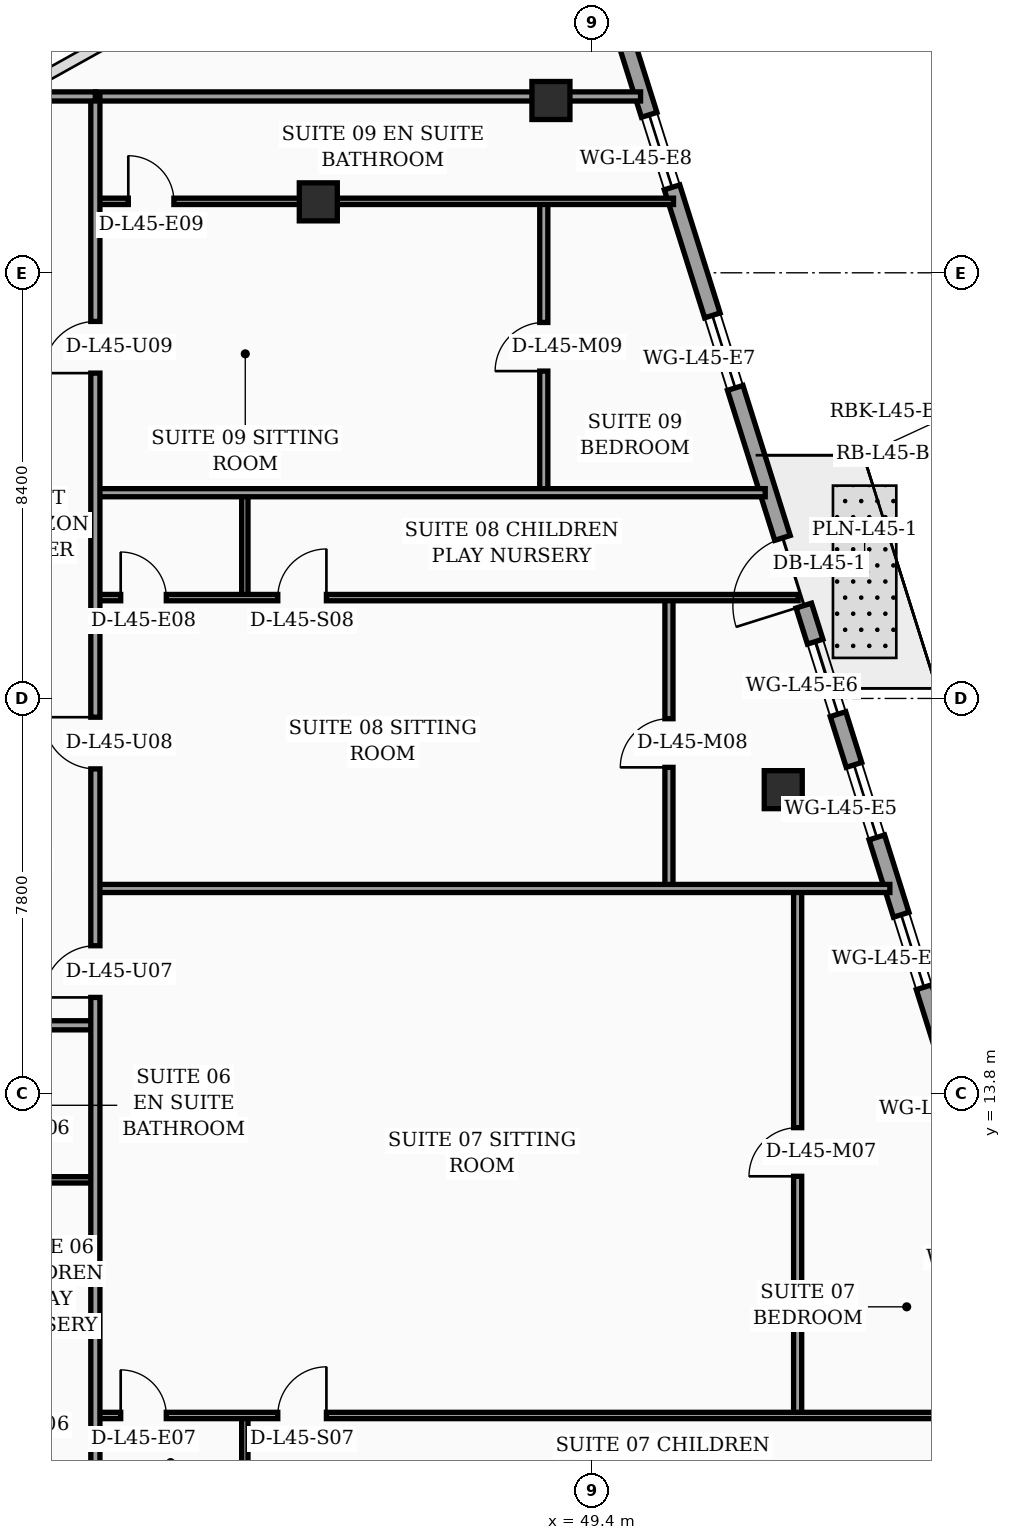
"""IFC4 building model, lengths in metres.
Left out: names, types, materials, properties, quantities, classifications, styles, units other than length and angle.
Written with IfcOpenShell. Run it as: python <this file> out.ifc"""

import sys

from ifc_helpers import new_model, si_unit, direction, frame, frame_2d, origin, origin_2d, place, context, subcontext, project, spatial, rectangle, hollow_rectangle, extrude, element, fill, save


model = new_model("IFC4")
c1 = context("Model", 3, precision=1e-05, world=origin(), true_north=direction((0.0, 1.0)))
c2 = subcontext(c1, "Body", "Model", "MODEL_VIEW")
j1 = project(units=[si_unit("LENGTHUNIT", "METRE"), si_unit("PLANEANGLEUNIT", "RADIAN")], contexts=[c1])
p1 = place(None, origin())
s1 = spatial("IfcSite", under=j1, at=p1, CompositionType="ELEMENT")
p2 = place(p1, origin())
s2 = spatial("IfcBuilding", under=s1, at=p2, CompositionType="ELEMENT")
p3 = place(p2, frame((0.0, 0.0, 182.7)))
s3 = spatial("IfcBuildingStorey", under=s2, at=p3, CompositionType="ELEMENT", Elevation=182.7)
for number, where, z_axis, x_axis in (
    (1, (44.0, 31.4, 0.0), (0.0, 0.0, 1.0), (1.0, 0.0, 0.0)),
    (2, (53.176, 19.8, 0.0), (0.0, 0.0, 1.0), (1.0, 0.0, 0.0)),
    (3, (48.591, 33.4, 0.0), (0.0, 0.0, 1.0), (1.0, 0.0, 0.0)),
):
    element("IfcColumn", number, at=place(p3, frame(where, z_axis=z_axis, x_axis=x_axis)), inside=s3, PredefinedType="COLUMN", context=c2, shape_type="SweptSolid", body=[
        extrude(hollow_rectangle(XDim=0.75, YDim=0.75, WallThickness=0.032, at=origin_2d()), origin(), (0.0, 0.0, 1.0), 3.52),
    ])
p4 = place(p3, frame((59.23, 5.505, 0.0), z_axis=(0.0, 0.0, 1.0), x_axis=(-0.300509063924, 0.953778958931, 0.0)))
e4 = element("IfcWall", 4, at=p4, inside=s3, PredefinedType="SOLIDWALL", context=c2, shape_type="SweptSolid", body=[
    extrude(rectangle(XDim=30.814, YDim=0.32, at=frame_2d((15.407, 0.0))), origin(), (0.0, 0.0, 1.0), 3.52),
])
p5 = place(p4, frame((18.796, 0.0, 0.0)))
e5 = element("IfcOpeningElement", 5, at=p5, cuts=e4, PredefinedType="OPENING", context=c2, shape_type="SweptSolid", body=[
    extrude(rectangle(XDim=1.4, YDim=2.25, at=frame_2d((0.7, 1.125))), frame((0.0, 0.17, 0.0), z_axis=(0.0, -1.0, 0.0), x_axis=(1.0, 0.0, 0.0)), (0.0, 0.0, 1.0), 0.34),
])
p6 = place(p4, frame((2.65, 0.0, 0.75)))
e6 = element("IfcOpeningElement", 6, at=p6, cuts=e4, PredefinedType="OPENING", context=c2, shape_type="SweptSolid", body=[
    extrude(rectangle(XDim=1.5, YDim=1.6, at=frame_2d((0.75, 0.8))), frame((0.0, 0.17, 0.0), z_axis=(0.0, -1.0, 0.0), x_axis=(1.0, 0.0, 0.0)), (0.0, 0.0, 1.0), 0.34),
])
p7 = place(p4, frame((4.7, 0.0, 0.75)))
e7 = element("IfcOpeningElement", 7, at=p7, cuts=e4, PredefinedType="OPENING", context=c2, shape_type="SweptSolid", body=[
    extrude(rectangle(XDim=1.5, YDim=1.6, at=frame_2d((0.75, 0.8))), frame((0.0, 0.17, 0.0), z_axis=(0.0, -1.0, 0.0), x_axis=(1.0, 0.0, 0.0)), (0.0, 0.0, 1.0), 0.34),
])
p8 = place(p4, frame((7.8, 0.0, 0.75)))
e8 = element("IfcOpeningElement", 8, at=p8, cuts=e4, PredefinedType="OPENING", context=c2, shape_type="SweptSolid", body=[
    extrude(rectangle(XDim=1.5, YDim=1.6, at=frame_2d((0.75, 0.8))), frame((0.0, 0.17, 0.0), z_axis=(0.0, -1.0, 0.0), x_axis=(1.0, 0.0, 0.0)), (0.0, 0.0, 1.0), 0.34),
])
p9 = place(p4, frame((10.9, 0.0, 0.75)))
e9 = element("IfcOpeningElement", 9, at=p9, cuts=e4, PredefinedType="OPENING", context=c2, shape_type="SweptSolid", body=[
    extrude(rectangle(XDim=1.5, YDim=1.6, at=frame_2d((0.75, 0.8))), frame((0.0, 0.17, 0.0), z_axis=(0.0, -1.0, 0.0), x_axis=(1.0, 0.0, 0.0)), (0.0, 0.0, 1.0), 0.34),
])
p10 = place(p4, frame((14.0, 0.0, 0.75)))
e10 = element("IfcOpeningElement", 10, at=p10, cuts=e4, PredefinedType="OPENING", context=c2, shape_type="SweptSolid", body=[
    extrude(rectangle(XDim=1.5, YDim=1.6, at=frame_2d((0.75, 0.8))), frame((0.0, 0.17, 0.0), z_axis=(0.0, -1.0, 0.0), x_axis=(1.0, 0.0, 0.0)), (0.0, 0.0, 1.0), 0.34),
])
p11 = place(p4, frame((16.55, 0.0, 0.75)))
e11 = element("IfcOpeningElement", 11, at=p11, cuts=e4, PredefinedType="OPENING", context=c2, shape_type="SweptSolid", body=[
    extrude(rectangle(XDim=1.5, YDim=1.6, at=frame_2d((0.75, 0.8))), frame((0.0, 0.17, 0.0), z_axis=(0.0, -1.0, 0.0), x_axis=(1.0, 0.0, 0.0)), (0.0, 0.0, 1.0), 0.34),
])
p12 = place(p4, frame((23.3, 0.0, 0.75)))
e12 = element("IfcOpeningElement", 12, at=p12, cuts=e4, PredefinedType="OPENING", context=c2, shape_type="SweptSolid", body=[
    extrude(rectangle(XDim=1.5, YDim=1.6, at=frame_2d((0.75, 0.8))), frame((0.0, 0.17, 0.0), z_axis=(0.0, -1.0, 0.0), x_axis=(1.0, 0.0, 0.0)), (0.0, 0.0, 1.0), 0.34),
])
p13 = place(p4, frame((27.45, 0.0, 0.75)))
e13 = element("IfcOpeningElement", 13, at=p13, cuts=e4, PredefinedType="OPENING", context=c2, shape_type="SweptSolid", body=[
    extrude(rectangle(XDim=1.5, YDim=1.6, at=frame_2d((0.75, 0.8))), frame((0.0, 0.17, 0.0), z_axis=(0.0, -1.0, 0.0), x_axis=(1.0, 0.0, 0.0)), (0.0, 0.0, 1.0), 0.34),
])
p14 = place(p3, frame((37.6, 12.1, 0.0), z_axis=(0.0, 0.0, 1.0), x_axis=(1.0, 0.0, 0.0)))
e14 = element("IfcWall", 14, at=p14, inside=s3, PredefinedType="PARTITIONING", context=c2, shape_type="SweptSolid", body=[
    extrude(rectangle(XDim=2.0, YDim=0.125, at=frame_2d((1.0, 0.0))), origin(), (0.0, 0.0, 1.0), 3.52),
])
p15 = place(p3, frame((32.4, 15.15, 0.0), z_axis=(0.0, 0.0, 1.0), x_axis=(1.0, 0.0, 0.0)))
e15 = element("IfcWall", 15, at=p15, inside=s3, PredefinedType="PARTITIONING", context=c2, shape_type="SweptSolid", body=[
    extrude(rectangle(XDim=7.2, YDim=0.18, at=frame_2d((3.6, 0.0))), origin(), (0.0, 0.0, 1.0), 2.92),
])
p16 = place(p15, frame((2.19, 0.0, 0.0)))
e16 = element("IfcOpeningElement", 16, at=p16, cuts=e15, PredefinedType="OPENING", context=c2, shape_type="SweptSolid", body=[
    extrude(rectangle(XDim=1.02, YDim=2.2, at=frame_2d((0.51, 1.1))), frame((0.0, 0.1, 0.0), z_axis=(0.0, -1.0, 0.0), x_axis=(1.0, 0.0, 0.0)), (0.0, 0.0, 1.0), 0.2),
])
p17 = place(p3, frame((42.55, 5.66, 0.0), z_axis=(0.0, 0.0, 1.0), x_axis=(0.0, 1.0, 0.0)))
e17 = element("IfcWall", 17, at=p17, inside=s3, PredefinedType="PARTITIONING", context=c2, shape_type="SweptSolid", body=[
    extrude(rectangle(XDim=1.79, YDim=0.125, at=frame_2d((0.895, 0.0))), origin(), (0.0, 0.0, 1.0), 3.52),
])
p18 = place(p3, frame((53.46, 7.45, 0.0), z_axis=(0.0, 0.0, 1.0), x_axis=(0.0, 1.0, 0.0)))
e18 = element("IfcWall", 18, at=p18, inside=s3, PredefinedType="PARTITIONING", context=c2, shape_type="SweptSolid", body=[
    extrude(rectangle(XDim=10.4, YDim=0.16, at=frame_2d((5.2, 0.0))), origin(), (0.0, 0.0, 1.0), 3.02),
])
p19 = place(p18, frame((4.72, 0.0, 0.0)))
e19 = element("IfcOpeningElement", 19, at=p19, cuts=e18, PredefinedType="OPENING", context=c2, shape_type="SweptSolid", body=[
    extrude(rectangle(XDim=0.96, YDim=2.2, at=frame_2d((0.48, 1.1))), frame((0.0, 0.09, 0.0), z_axis=(0.0, -1.0, 0.0), x_axis=(1.0, 0.0, 0.0)), (0.0, 0.0, 1.0), 0.18),
])
p20 = place(p3, frame((39.6, 7.45, 0.0), z_axis=(0.0, 0.0, 1.0), x_axis=(1.0, 0.0, 0.0)))
e20 = element("IfcWall", 20, at=p20, inside=s3, PredefinedType="PARTITIONING", context=c2, shape_type="SweptSolid", body=[
    extrude(rectangle(XDim=18.96, YDim=0.125, at=frame_2d((9.48, 0.0))), origin(), (0.0, 0.0, 1.0), 2.92),
])
p21 = place(p20, frame((0.5, 0.0, 0.0)))
e21 = element("IfcOpeningElement", 21, at=p21, cuts=e20, PredefinedType="OPENING", context=c2, shape_type="SweptSolid", body=[
    extrude(rectangle(XDim=0.9, YDim=2.15, at=frame_2d((0.45, 1.075))), frame((0.0, 0.073, 0.0), z_axis=(0.0, -1.0, 0.0), x_axis=(1.0, 0.0, 0.0)), (0.0, 0.0, 1.0), 0.145),
])
p22 = place(p20, frame((3.6, 0.0, 0.0)))
e22 = element("IfcOpeningElement", 22, at=p22, cuts=e20, PredefinedType="OPENING", context=c2, shape_type="SweptSolid", body=[
    extrude(rectangle(XDim=0.96, YDim=2.2, at=frame_2d((0.48, 1.1))), frame((0.0, 0.073, 0.0), z_axis=(0.0, -1.0, 0.0), x_axis=(1.0, 0.0, 0.0)), (0.0, 0.0, 1.0), 0.145),
])
p23 = place(p3, frame((42.55, 23.59, 0.0), z_axis=(0.0, 0.0, 1.0), x_axis=(0.0, 1.0, 0.0)))
e23 = element("IfcWall", 23, at=p23, inside=s3, PredefinedType="PARTITIONING", context=c2, shape_type="SweptSolid", body=[
    extrude(rectangle(XDim=2.07, YDim=0.125, at=frame_2d((1.035, 0.0))), origin(), (0.0, 0.0, 1.0), 3.17),
])
p24 = place(p3, frame((50.92, 17.85, 0.0), z_axis=(0.0, 0.0, 1.0), x_axis=(0.0, 1.0, 0.0)))
e24 = element("IfcWall", 24, at=p24, inside=s3, PredefinedType="PARTITIONING", context=c2, shape_type="SweptSolid", body=[
    extrude(rectangle(XDim=5.74, YDim=0.16, at=frame_2d((2.87, 0.0))), origin(), (0.0, 0.0, 1.0), 2.92),
])
p25 = place(p24, frame((2.39, 0.0, 0.0)))
e25 = element("IfcOpeningElement", 25, at=p25, cuts=e24, PredefinedType="OPENING", context=c2, shape_type="SweptSolid", body=[
    extrude(rectangle(XDim=0.96, YDim=2.2, at=frame_2d((0.48, 1.1))), frame((0.0, 0.09, 0.0), z_axis=(0.0, -1.0, 0.0), x_axis=(1.0, 0.0, 0.0)), (0.0, 0.0, 1.0), 0.18),
])
p26 = place(p3, frame((39.6, 23.59, 0.0), z_axis=(0.0, 0.0, 1.0), x_axis=(1.0, 0.0, 0.0)))
e26 = element("IfcWall", 26, at=p26, inside=s3, PredefinedType="PARTITIONING", context=c2, shape_type="SweptSolid", body=[
    extrude(rectangle(XDim=13.87, YDim=0.125, at=frame_2d((6.935, 0.0))), origin(), (0.0, 0.0, 1.0), 2.92),
])
p27 = place(p26, frame((0.5, 0.0, 0.0)))
e27 = element("IfcOpeningElement", 27, at=p27, cuts=e26, PredefinedType="OPENING", context=c2, shape_type="SweptSolid", body=[
    extrude(rectangle(XDim=0.9, YDim=2.15, at=frame_2d((0.45, 1.075))), frame((0.0, 0.073, 0.0), z_axis=(0.0, -1.0, 0.0), x_axis=(1.0, 0.0, 0.0)), (0.0, 0.0, 1.0), 0.145),
])
p28 = place(p26, frame((3.6, 0.0, 0.0)))
e28 = element("IfcOpeningElement", 28, at=p28, cuts=e26, PredefinedType="OPENING", context=c2, shape_type="SweptSolid", body=[
    extrude(rectangle(XDim=0.96, YDim=2.2, at=frame_2d((0.48, 1.1))), frame((0.0, 0.073, 0.0), z_axis=(0.0, -1.0, 0.0), x_axis=(1.0, 0.0, 0.0)), (0.0, 0.0, 1.0), 0.145),
])
p29 = place(p3, frame((48.45, 25.66, 0.0), z_axis=(0.0, 0.0, 1.0), x_axis=(0.0, 1.0, 0.0)))
e29 = element("IfcWall", 29, at=p29, inside=s3, PredefinedType="PARTITIONING", context=c2, shape_type="SweptSolid", body=[
    extrude(rectangle(XDim=5.75, YDim=0.16, at=frame_2d((2.875, 0.0))), origin(), (0.0, 0.0, 1.0), 3.52),
])
p30 = place(p29, frame((2.4, 0.0, 0.0)))
e30 = element("IfcOpeningElement", 30, at=p30, cuts=e29, PredefinedType="OPENING", context=c2, shape_type="SweptSolid", body=[
    extrude(rectangle(XDim=0.96, YDim=2.2, at=frame_2d((0.48, 1.1))), frame((0.0, 0.09, 0.0), z_axis=(0.0, -1.0, 0.0), x_axis=(1.0, 0.0, 0.0)), (0.0, 0.0, 1.0), 0.18),
])
p31 = place(p3, frame((39.6, 31.41, 0.0), z_axis=(0.0, 0.0, 1.0), x_axis=(1.0, 0.0, 0.0)))
e31 = element("IfcWall", 31, at=p31, inside=s3, PredefinedType="PARTITIONING", context=c2, shape_type="SweptSolid", body=[
    extrude(rectangle(XDim=11.41, YDim=0.125, at=frame_2d((5.705, 0.0))), origin(), (0.0, 0.0, 1.0), 2.92),
])
p32 = place(p31, frame((0.65, 0.0, 0.0)))
e32 = element("IfcOpeningElement", 32, at=p32, cuts=e31, PredefinedType="OPENING", context=c2, shape_type="SweptSolid", body=[
    extrude(rectangle(XDim=0.9, YDim=2.15, at=frame_2d((0.45, 1.075))), frame((0.0, 0.073, 0.0), z_axis=(0.0, -1.0, 0.0), x_axis=(1.0, 0.0, 0.0)), (0.0, 0.0, 1.0), 0.145),
])
p33 = place(p3, frame((39.6, 25.66, 0.0), z_axis=(0.0, 0.0, 1.0), x_axis=(1.0, 0.0, 0.0)))
e33 = element("IfcWall", 33, at=p33, inside=s3, PredefinedType="PARTITIONING", context=c2, shape_type="SweptSolid", body=[
    extrude(rectangle(XDim=13.22, YDim=0.16, at=frame_2d((6.61, 0.0))), origin(), (0.0, 0.0, 1.0), 2.92),
])
p34 = place(p3, frame((39.6, 17.85, 0.0), z_axis=(0.0, 0.0, 1.0), x_axis=(1.0, 0.0, 0.0)))
e34 = element("IfcWall", 34, at=p34, inside=s3, PredefinedType="PARTITIONING", context=c2, shape_type="SweptSolid", body=[
    extrude(rectangle(XDim=15.68, YDim=0.16, at=frame_2d((7.84, 0.0))), origin(), (0.0, 0.0, 1.0), 2.92),
])
p35 = place(p3, frame((39.6, 33.48, 0.0), z_axis=(0.0, 0.0, 1.0), x_axis=(1.0, 0.0, 0.0)))
e35 = element("IfcWall", 35, at=p35, inside=s3, PredefinedType="PARTITIONING", context=c2, shape_type="SweptSolid", body=[
    extrude(rectangle(XDim=10.76, YDim=0.18, at=frame_2d((5.38, 0.0))), origin(), (0.0, 0.0, 1.0), 2.92),
])
p36 = place(p3, frame((39.6, 2.44, 0.0), z_axis=(0.0, 0.0, 1.0), x_axis=(0.0, 1.0, 0.0)))
e36 = element("IfcWall", 36, at=p36, inside=s3, PredefinedType="PARTITIONING", context=c2, shape_type="SweptSolid", body=[
    extrude(rectangle(XDim=31.04, YDim=0.18, at=frame_2d((15.52, 0.0))), origin(), (0.0, 0.0, 1.0), 2.92),
])
p37 = place(p36, frame((13.26, 0.0, 0.0)))
e37 = element("IfcOpeningElement", 37, at=p37, cuts=e36, PredefinedType="OPENING", context=c2, shape_type="SweptSolid", body=[
    extrude(rectangle(XDim=1.02, YDim=2.2, at=frame_2d((0.51, 1.1))), frame((0.0, 0.1, 0.0), z_axis=(0.0, -1.0, 0.0), x_axis=(1.0, 0.0, 0.0)), (0.0, 0.0, 1.0), 0.2),
])
p38 = place(p36, frame((17.77, 0.0, 0.0)))
e38 = element("IfcOpeningElement", 38, at=p38, cuts=e36, PredefinedType="OPENING", context=c2, shape_type="SweptSolid", body=[
    extrude(rectangle(XDim=1.02, YDim=2.2, at=frame_2d((0.51, 1.1))), frame((0.0, 0.1, 0.0), z_axis=(0.0, -1.0, 0.0), x_axis=(1.0, 0.0, 0.0)), (0.0, 0.0, 1.0), 0.2),
])
p39 = place(p36, frame((25.58, 0.0, 0.0)))
e39 = element("IfcOpeningElement", 39, at=p39, cuts=e36, PredefinedType="OPENING", context=c2, shape_type="SweptSolid", body=[
    extrude(rectangle(XDim=1.02, YDim=2.2, at=frame_2d((0.51, 1.1))), frame((0.0, 0.1, 0.0), z_axis=(0.0, -1.0, 0.0), x_axis=(1.0, 0.0, 0.0)), (0.0, 0.0, 1.0), 0.2),
])
p40 = place(p3, frame((37.25, 33.48, 0.0), z_axis=(0.0, 0.0, 1.0), x_axis=(1.0, 0.0, 0.0)))
e40 = element("IfcWall", 40, at=p40, inside=s3, PredefinedType="PARTITIONING", context=c2, shape_type="SweptSolid", body=[
    extrude(rectangle(XDim=2.35, YDim=0.18, at=frame_2d((1.175, 0.0))), origin(), (0.0, 0.0, 1.0), 3.52),
])
p41 = place(p5, origin())
e41 = element("IfcDoor", 41, at=p41, inside=s3, OperationType="SINGLE_SWING_LEFT", PredefinedType="DOOR", context=c2, shape_type="SweptSolid", body=[
    extrude(rectangle(XDim=1.4, YDim=2.25, at=frame_2d((0.7, 1.125))), frame((0.0, 0.025, 0.0), z_axis=(0.0, -1.0, 0.0), x_axis=(1.0, 0.0, 0.0)), (0.0, 0.0, 1.0), 0.05),
])
fill(e5, e41)
p42 = place(p9, origin())
e42 = element("IfcWindow", 42, at=p42, inside=s3, PartitioningType="SINGLE_PANEL", PredefinedType="WINDOW", context=c2, shape_type="SweptSolid", body=[
    extrude(rectangle(XDim=1.5, YDim=1.6, at=frame_2d((0.75, 0.8))), frame((0.0, 0.03, 0.0), z_axis=(0.0, -1.0, 0.0), x_axis=(1.0, 0.0, 0.0)), (0.0, 0.0, 1.0), 0.06),
])
fill(e9, e42)
p43 = place(p10, origin())
e43 = element("IfcWindow", 43, at=p43, inside=s3, PartitioningType="SINGLE_PANEL", PredefinedType="WINDOW", context=c2, shape_type="SweptSolid", body=[
    extrude(rectangle(XDim=1.5, YDim=1.6, at=frame_2d((0.75, 0.8))), frame((0.0, 0.03, 0.0), z_axis=(0.0, -1.0, 0.0), x_axis=(1.0, 0.0, 0.0)), (0.0, 0.0, 1.0), 0.06),
])
fill(e10, e43)
p44 = place(p11, origin())
e44 = element("IfcWindow", 44, at=p44, inside=s3, PartitioningType="SINGLE_PANEL", PredefinedType="WINDOW", context=c2, shape_type="SweptSolid", body=[
    extrude(rectangle(XDim=1.5, YDim=1.6, at=frame_2d((0.75, 0.8))), frame((0.0, 0.03, 0.0), z_axis=(0.0, -1.0, 0.0), x_axis=(1.0, 0.0, 0.0)), (0.0, 0.0, 1.0), 0.06),
])
fill(e11, e44)
p45 = place(p12, origin())
e45 = element("IfcWindow", 45, at=p45, inside=s3, PartitioningType="SINGLE_PANEL", PredefinedType="WINDOW", context=c2, shape_type="SweptSolid", body=[
    extrude(rectangle(XDim=1.5, YDim=1.6, at=frame_2d((0.75, 0.8))), frame((0.0, 0.03, 0.0), z_axis=(0.0, -1.0, 0.0), x_axis=(1.0, 0.0, 0.0)), (0.0, 0.0, 1.0), 0.06),
])
fill(e12, e45)
p46 = place(p13, origin())
e46 = element("IfcWindow", 46, at=p46, inside=s3, PartitioningType="SINGLE_PANEL", PredefinedType="WINDOW", context=c2, shape_type="SweptSolid", body=[
    extrude(rectangle(XDim=1.5, YDim=1.6, at=frame_2d((0.75, 0.8))), frame((0.0, 0.03, 0.0), z_axis=(0.0, -1.0, 0.0), x_axis=(1.0, 0.0, 0.0)), (0.0, 0.0, 1.0), 0.06),
])
fill(e13, e46)
p47 = place(p19, origin())
e47 = element("IfcDoor", 47, at=p47, inside=s3, OperationType="SINGLE_SWING_LEFT", PredefinedType="DOOR", context=c2, shape_type="SweptSolid", body=[
    extrude(rectangle(XDim=0.96, YDim=2.2, at=frame_2d((0.48, 1.1))), frame((0.0, 0.025, 0.0), z_axis=(0.0, -1.0, 0.0), x_axis=(1.0, 0.0, 0.0)), (0.0, 0.0, 1.0), 0.05),
])
fill(e19, e47)
p48 = place(p21, origin())
e48 = element("IfcDoor", 48, at=p48, inside=s3, OperationType="SINGLE_SWING_LEFT", PredefinedType="DOOR", context=c2, shape_type="SweptSolid", body=[
    extrude(rectangle(XDim=0.9, YDim=2.15, at=frame_2d((0.45, 1.075))), frame((0.0, 0.025, 0.0), z_axis=(0.0, -1.0, 0.0), x_axis=(1.0, 0.0, 0.0)), (0.0, 0.0, 1.0), 0.05),
])
fill(e21, e48)
p49 = place(p22, origin())
e49 = element("IfcDoor", 49, at=p49, inside=s3, OperationType="SINGLE_SWING_RIGHT", PredefinedType="DOOR", context=c2, shape_type="SweptSolid", body=[
    extrude(rectangle(XDim=0.96, YDim=2.2, at=frame_2d((0.48, 1.1))), frame((0.0, 0.025, 0.0), z_axis=(0.0, -1.0, 0.0), x_axis=(1.0, 0.0, 0.0)), (0.0, 0.0, 1.0), 0.05),
])
fill(e22, e49)
p50 = place(p25, origin())
e50 = element("IfcDoor", 50, at=p50, inside=s3, OperationType="SINGLE_SWING_LEFT", PredefinedType="DOOR", context=c2, shape_type="SweptSolid", body=[
    extrude(rectangle(XDim=0.96, YDim=2.2, at=frame_2d((0.48, 1.1))), frame((0.0, 0.025, 0.0), z_axis=(0.0, -1.0, 0.0), x_axis=(1.0, 0.0, 0.0)), (0.0, 0.0, 1.0), 0.05),
])
fill(e25, e50)
p51 = place(p27, origin())
e51 = element("IfcDoor", 51, at=p51, inside=s3, OperationType="SINGLE_SWING_LEFT", PredefinedType="DOOR", context=c2, shape_type="SweptSolid", body=[
    extrude(rectangle(XDim=0.9, YDim=2.15, at=frame_2d((0.45, 1.075))), frame((0.0, 0.025, 0.0), z_axis=(0.0, -1.0, 0.0), x_axis=(1.0, 0.0, 0.0)), (0.0, 0.0, 1.0), 0.05),
])
fill(e27, e51)
p52 = place(p28, origin())
e52 = element("IfcDoor", 52, at=p52, inside=s3, OperationType="SINGLE_SWING_RIGHT", PredefinedType="DOOR", context=c2, shape_type="SweptSolid", body=[
    extrude(rectangle(XDim=0.96, YDim=2.2, at=frame_2d((0.48, 1.1))), frame((0.0, 0.025, 0.0), z_axis=(0.0, -1.0, 0.0), x_axis=(1.0, 0.0, 0.0)), (0.0, 0.0, 1.0), 0.05),
])
fill(e28, e52)
p53 = place(p30, origin())
e53 = element("IfcDoor", 53, at=p53, inside=s3, OperationType="SINGLE_SWING_LEFT", PredefinedType="DOOR", context=c2, shape_type="SweptSolid", body=[
    extrude(rectangle(XDim=0.96, YDim=2.2, at=frame_2d((0.48, 1.1))), frame((0.0, 0.025, 0.0), z_axis=(0.0, -1.0, 0.0), x_axis=(1.0, 0.0, 0.0)), (0.0, 0.0, 1.0), 0.05),
])
fill(e30, e53)
p54 = place(p32, origin())
e54 = element("IfcDoor", 54, at=p54, inside=s3, OperationType="SINGLE_SWING_LEFT", PredefinedType="DOOR", context=c2, shape_type="SweptSolid", body=[
    extrude(rectangle(XDim=0.9, YDim=2.15, at=frame_2d((0.45, 1.075))), frame((0.0, 0.025, 0.0), z_axis=(0.0, -1.0, 0.0), x_axis=(1.0, 0.0, 0.0)), (0.0, 0.0, 1.0), 0.05),
])
fill(e32, e54)
p55 = place(p37, origin())
e55 = element("IfcDoor", 55, at=p55, inside=s3, OperationType="SINGLE_SWING_LEFT", PredefinedType="DOOR", context=c2, shape_type="SweptSolid", body=[
    extrude(rectangle(XDim=1.02, YDim=2.2, at=frame_2d((0.51, 1.1))), frame((0.0, 0.025, 0.0), z_axis=(0.0, -1.0, 0.0), x_axis=(1.0, 0.0, 0.0)), (0.0, 0.0, 1.0), 0.05),
])
fill(e37, e55)
p56 = place(p38, origin())
e56 = element("IfcDoor", 56, at=p56, inside=s3, OperationType="SINGLE_SWING_RIGHT", PredefinedType="DOOR", context=c2, shape_type="SweptSolid", body=[
    extrude(rectangle(XDim=1.02, YDim=2.2, at=frame_2d((0.51, 1.1))), frame((0.0, 0.025, 0.0), z_axis=(0.0, -1.0, 0.0), x_axis=(1.0, 0.0, 0.0)), (0.0, 0.0, 1.0), 0.05),
])
fill(e38, e56)
p57 = place(p39, origin())
e57 = element("IfcDoor", 57, at=p57, inside=s3, OperationType="SINGLE_SWING_LEFT", PredefinedType="DOOR", context=c2, shape_type="SweptSolid", body=[
    extrude(rectangle(XDim=1.02, YDim=2.2, at=frame_2d((0.51, 1.1))), frame((0.0, 0.025, 0.0), z_axis=(0.0, -1.0, 0.0), x_axis=(1.0, 0.0, 0.0)), (0.0, 0.0, 1.0), 0.05),
])
fill(e39, e57)
save(model, sys.argv[1])
